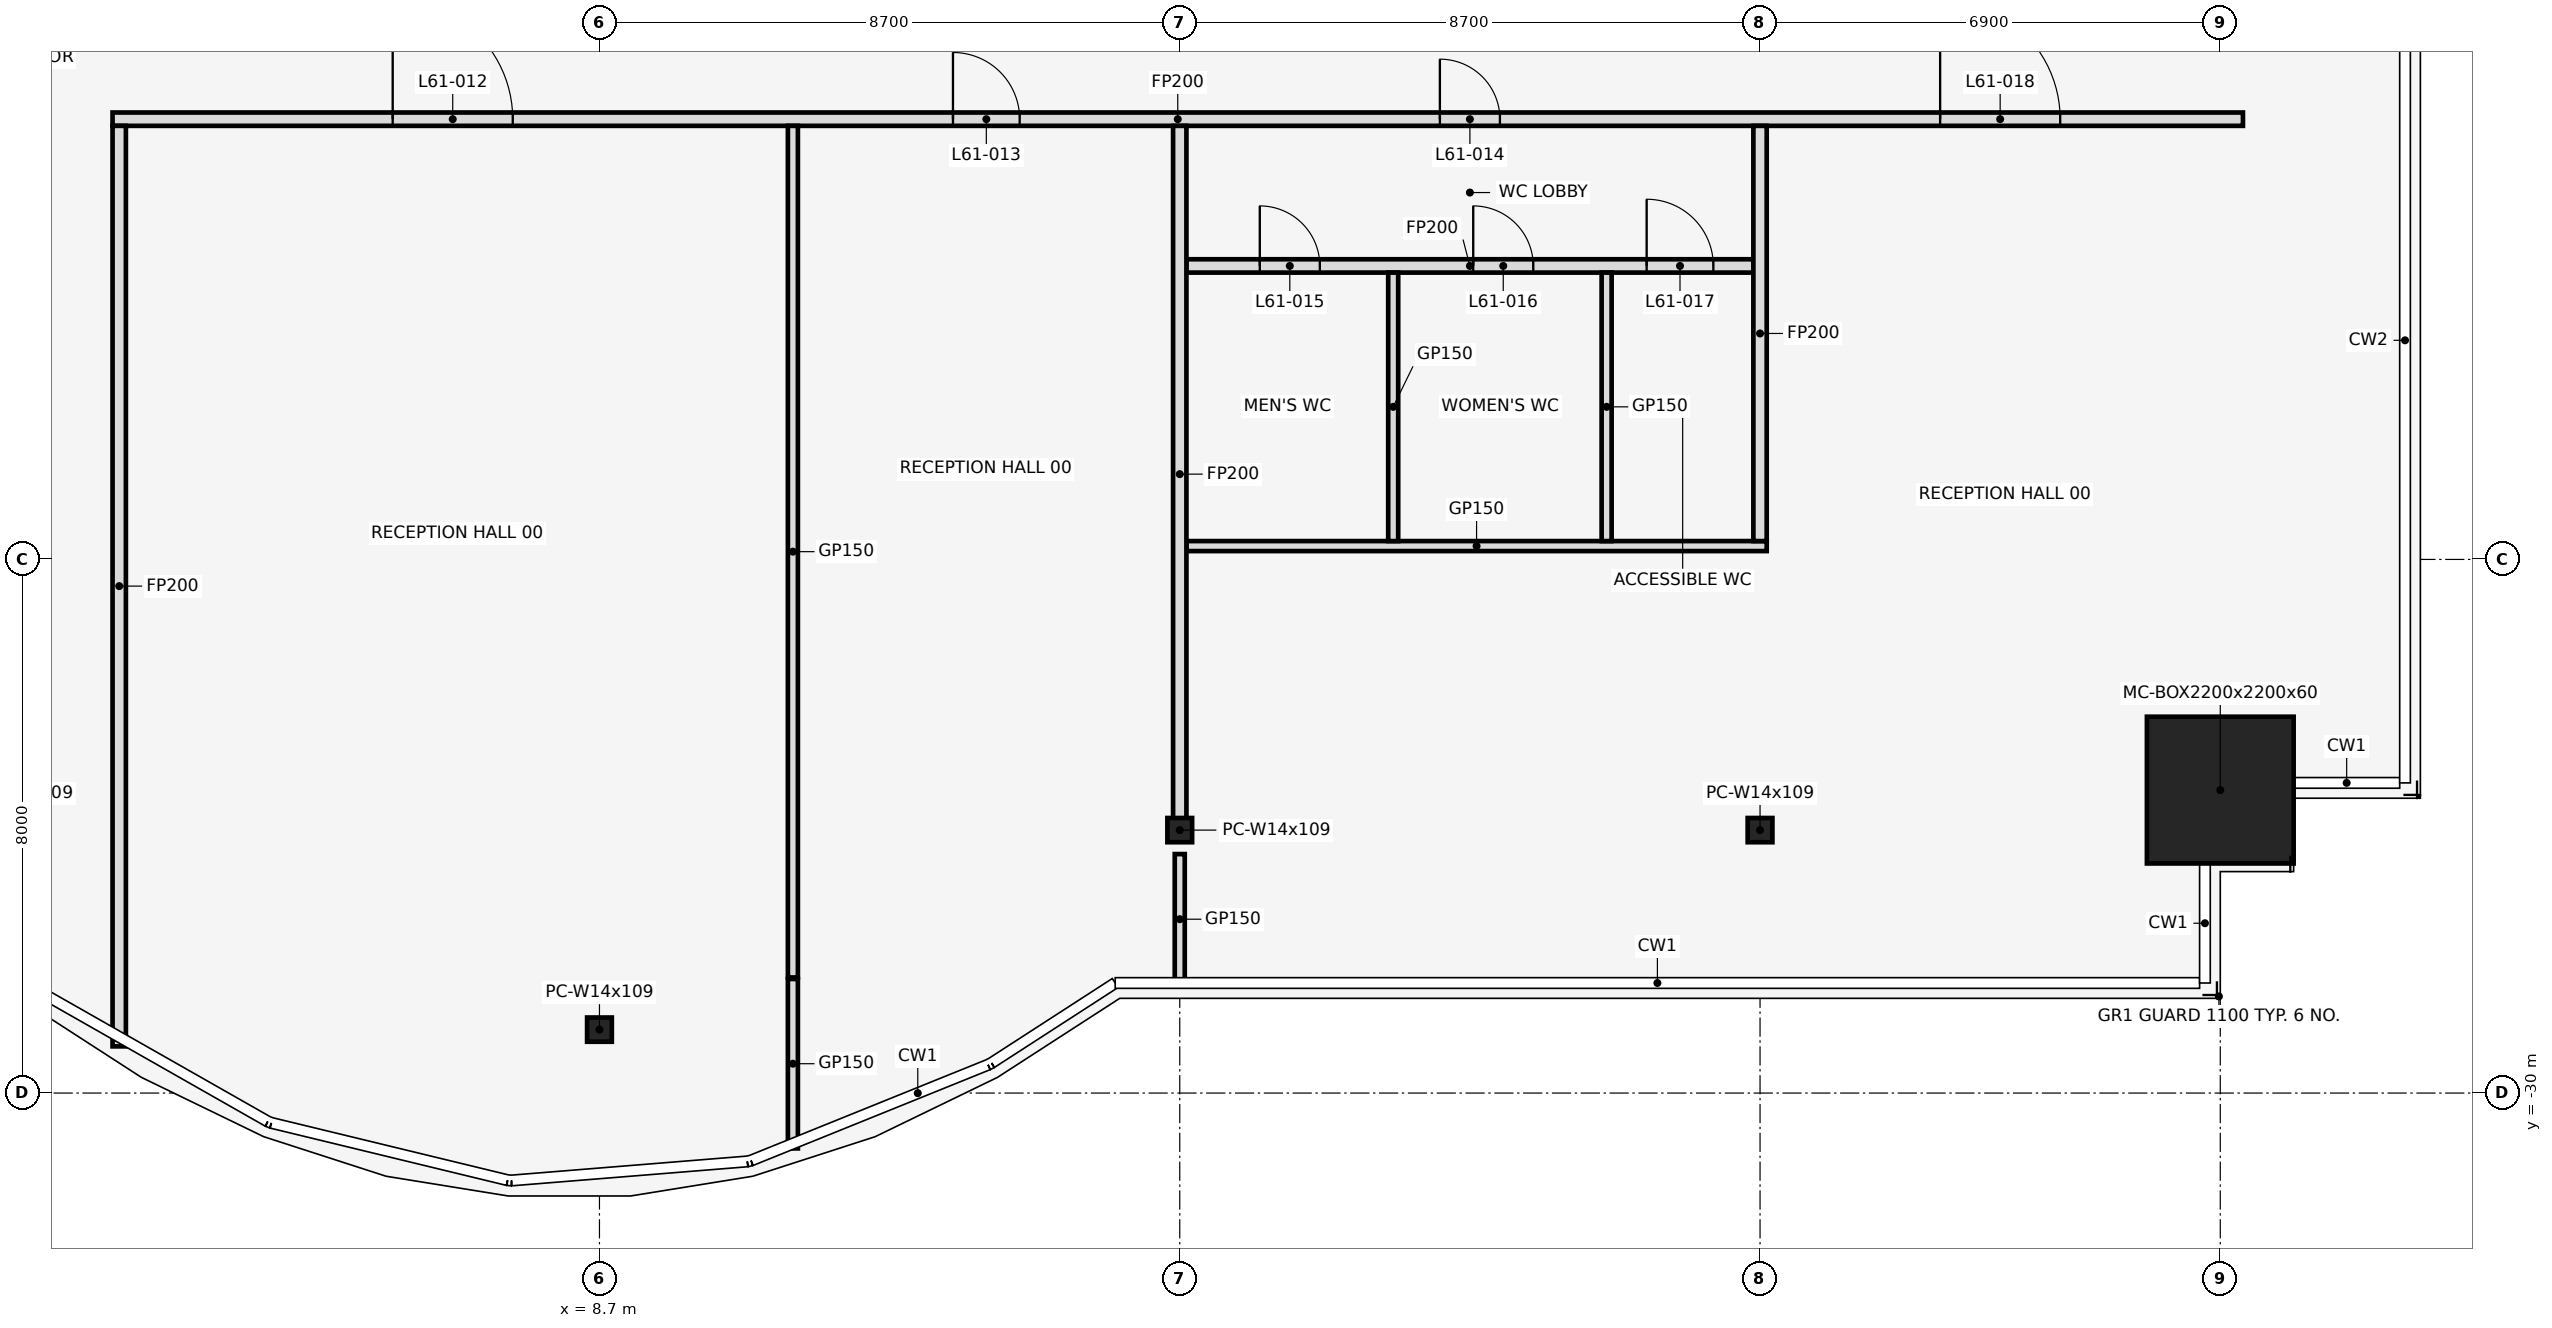
"""IFC4 building model, lengths in metres.
Left out: names, types, materials, properties, quantities, classifications, styles, units other than length and angle.
Written with IfcOpenShell. Run it as: python <this file> out.ifc"""

import sys

from ifc_helpers import new_model, si_unit, direction, frame, frame_2d, origin, origin_2d, place, context, subcontext, project, spatial, rectangle, hollow_rectangle, i_section, extrude, element, fill, save


model = new_model("IFC4")
c1 = context("Model", 3, precision=1e-05, world=origin(), true_north=direction((0.0, 1.0)))
c2 = subcontext(c1, "Body", "Model", "MODEL_VIEW")
j1 = project(units=[si_unit("LENGTHUNIT", "METRE"), si_unit("PLANEANGLEUNIT", "RADIAN")], contexts=[c1])
p1 = place(None, origin())
s1 = spatial("IfcSite", under=j1, at=p1, CompositionType="ELEMENT")
p2 = place(p1, origin())
s2 = spatial("IfcBuilding", under=s1, at=p2, CompositionType="ELEMENT")
p3 = place(p2, frame((0.0, 0.0, 270.8)))
s3 = spatial("IfcBuildingStorey", under=s2, at=p3, CompositionType="ELEMENT", Elevation=270.8)
for number, where, z_axis, x_axis in (
    (1, (8.7, -29.049, 0.0), (0.0, 0.0, 1.0), (1.0, 0.0, 0.0)),
    (2, (17.4, -26.058, 0.0), (0.0, 0.0, 1.0), (1.0, 0.0, 0.0)),
    (3, (26.1, -26.058, 0.0), (0.0, 0.0, 1.0), (1.0, 0.0, 0.0)),
):
    element("IfcColumn", number, at=place(p3, frame(where, z_axis=z_axis, x_axis=x_axis)), inside=s3, PredefinedType="COLUMN", context=c2, shape_type="SweptSolid", body=[
        extrude(i_section(OverallWidth=0.371, OverallDepth=0.363, WebThickness=0.013, FlangeThickness=0.022, at=origin_2d()), origin(), (0.0, 0.0, 1.0), 4.2),
    ])
p4 = place(p3, frame((33.0, -25.458, 0.0), z_axis=(0.0, 0.0, 1.0), x_axis=(1.0, 0.0, 0.0)))
e4 = element("IfcColumn", 4, at=p4, inside=s3, PredefinedType="COLUMN", context=c2, shape_type="SweptSolid", body=[
    extrude(hollow_rectangle(XDim=2.2, YDim=2.2, WallThickness=0.06, at=origin_2d()), origin(), (0.0, 0.0, 1.0), 4.2),
])
p5 = place(p3, frame((17.5, -21.8, 0.0), z_axis=(0.0, 0.0, 1.0), x_axis=(1.0, 0.0, 0.0)))
e5 = element("IfcWall", 5, at=p5, inside=s3, PredefinedType="PARTITIONING", context=c2, shape_type="SweptSolid", body=[
    extrude(rectangle(XDim=8.7, YDim=0.15, at=frame_2d((4.35, 0.0))), origin(), (0.0, 0.0, 1.0), 3.118),
])
p6 = place(p3, frame((17.5, -17.6, 0.0), z_axis=(0.0, 0.0, 1.0), x_axis=(1.0, 0.0, 0.0)))
e6 = element("IfcWall", 6, at=p6, inside=s3, PredefinedType="PARTITIONING", context=c2, shape_type="SweptSolid", body=[
    extrude(rectangle(XDim=8.5, YDim=0.2, at=frame_2d((4.25, 0.0))), origin(), (0.0, 0.0, 1.0), 3.118),
])
p7 = place(p6, frame((1.1, 0.0, 0.0)))
e7 = element("IfcOpeningElement", 7, at=p7, cuts=e6, PredefinedType="OPENING", context=c2, shape_type="SweptSolid", body=[
    extrude(rectangle(XDim=0.9, YDim=2.1, at=frame_2d((0.45, 1.05))), frame((0.0, 0.112, 0.0), z_axis=(0.0, -1.0, 0.0), x_axis=(1.0, 0.0, 0.0)), (0.0, 0.0, 1.0), 0.224),
])
p8 = place(p6, frame((4.3, 0.0, 0.0)))
e8 = element("IfcOpeningElement", 8, at=p8, cuts=e6, PredefinedType="OPENING", context=c2, shape_type="SweptSolid", body=[
    extrude(rectangle(XDim=0.9, YDim=2.1, at=frame_2d((0.45, 1.05))), frame((0.0, 0.112, 0.0), z_axis=(0.0, -1.0, 0.0), x_axis=(1.0, 0.0, 0.0)), (0.0, 0.0, 1.0), 0.224),
])
p9 = place(p6, frame((6.9, 0.0, 0.0)))
e9 = element("IfcOpeningElement", 9, at=p9, cuts=e6, PredefinedType="OPENING", context=c2, shape_type="SweptSolid", body=[
    extrude(rectangle(XDim=1.0, YDim=2.1, at=frame_2d((0.5, 1.05))), frame((0.0, 0.112, 0.0), z_axis=(0.0, -1.0, 0.0), x_axis=(1.0, 0.0, 0.0)), (0.0, 0.0, 1.0), 0.224),
])
p10 = place(p3, frame((1.4, -15.4, 0.0), z_axis=(0.0, 0.0, 1.0), x_axis=(1.0, 0.0, 0.0)))
e10 = element("IfcWall", 10, at=p10, inside=s3, PredefinedType="PARTITIONING", context=c2, shape_type="SweptSolid", body=[
    extrude(rectangle(XDim=31.94, YDim=0.2, at=frame_2d((15.97, 0.0))), origin(), (0.0, 0.0, 1.0), 3.118),
])
p11 = place(p10, frame((4.2, 0.0, 0.0)))
e11 = element("IfcOpeningElement", 11, at=p11, cuts=e10, PredefinedType="OPENING", context=c2, shape_type="SweptSolid", body=[
    extrude(rectangle(XDim=1.8, YDim=2.1, at=frame_2d((0.9, 1.05))), frame((0.0, 0.112, 0.0), z_axis=(0.0, -1.0, 0.0), x_axis=(1.0, 0.0, 0.0)), (0.0, 0.0, 1.0), 0.224),
])
p12 = place(p10, frame((12.6, 0.0, 0.0)))
e12 = element("IfcOpeningElement", 12, at=p12, cuts=e10, PredefinedType="OPENING", context=c2, shape_type="SweptSolid", body=[
    extrude(rectangle(XDim=1.0, YDim=2.1, at=frame_2d((0.5, 1.05))), frame((0.0, 0.112, 0.0), z_axis=(0.0, -1.0, 0.0), x_axis=(1.0, 0.0, 0.0)), (0.0, 0.0, 1.0), 0.224),
])
p13 = place(p10, frame((19.9, 0.0, 0.0)))
e13 = element("IfcOpeningElement", 13, at=p13, cuts=e10, PredefinedType="OPENING", context=c2, shape_type="SweptSolid", body=[
    extrude(rectangle(XDim=0.9, YDim=2.1, at=frame_2d((0.45, 1.05))), frame((0.0, 0.112, 0.0), z_axis=(0.0, -1.0, 0.0), x_axis=(1.0, 0.0, 0.0)), (0.0, 0.0, 1.0), 0.224),
])
p14 = place(p10, frame((27.4, 0.0, 0.0)))
e14 = element("IfcOpeningElement", 14, at=p14, cuts=e10, PredefinedType="OPENING", context=c2, shape_type="SweptSolid", body=[
    extrude(rectangle(XDim=1.8, YDim=2.1, at=frame_2d((0.9, 1.05))), frame((0.0, 0.112, 0.0), z_axis=(0.0, -1.0, 0.0), x_axis=(1.0, 0.0, 0.0)), (0.0, 0.0, 1.0), 0.224),
])
p15 = place(p3, frame((1.5, -29.3, 0.0), z_axis=(0.0, 0.0, 1.0), x_axis=(0.0, 1.0, 0.0)))
e15 = element("IfcWall", 15, at=p15, inside=s3, PredefinedType="PARTITIONING", context=c2, shape_type="SweptSolid", body=[
    extrude(rectangle(XDim=13.8, YDim=0.2, at=frame_2d((6.9, 0.0))), origin(), (0.0, 0.0, 1.0), 3.118),
])
p16 = place(p3, frame((11.6, -30.83, 0.0), z_axis=(0.0, 0.0, 1.0), x_axis=(0.0, 1.0, 0.0)))
e16 = element("IfcWall", 16, at=p16, inside=s3, PredefinedType="PARTITIONING", context=c2, shape_type="SweptSolid", body=[
    extrude(rectangle(XDim=2.54, YDim=0.15, at=frame_2d((1.27, 0.0))), origin(), (0.0, 0.0, 1.0), 3.118),
])
p17 = place(p3, frame((11.6, -28.267, 0.0), z_axis=(0.0, 0.0, 1.0), x_axis=(0.0, 1.0, 0.0)))
e17 = element("IfcWall", 17, at=p17, inside=s3, PredefinedType="PARTITIONING", context=c2, shape_type="SweptSolid", body=[
    extrude(rectangle(XDim=12.767, YDim=0.15, at=frame_2d((6.384, 0.0))), origin(), (0.0, 0.0, 1.0), 3.118),
])
p18 = place(p3, frame((17.4, -28.37, 0.0), z_axis=(0.0, 0.0, 1.0), x_axis=(0.0, 1.0, 0.0)))
e18 = element("IfcWall", 18, at=p18, inside=s3, PredefinedType="PARTITIONING", context=c2, shape_type="SweptSolid", body=[
    extrude(rectangle(XDim=1.953, YDim=0.15, at=frame_2d((0.977, 0.0))), origin(), (0.0, 0.0, 1.0), 3.118),
])
p19 = place(p3, frame((17.4, -25.943, 0.0), z_axis=(0.0, 0.0, 1.0), x_axis=(0.0, 1.0, 0.0)))
e19 = element("IfcWall", 19, at=p19, inside=s3, PredefinedType="PARTITIONING", context=c2, shape_type="SweptSolid", body=[
    extrude(rectangle(XDim=10.443, YDim=0.2, at=frame_2d((5.221, 0.0))), origin(), (0.0, 0.0, 1.0), 3.118),
])
for number, where, z_axis, x_axis in (
    (20, (20.6, -21.725, 0.0), (0.0, 0.0, 1.0), (0.0, 1.0, 0.0)),
    (21, (23.8, -21.725, 0.0), (0.0, 0.0, 1.0), (0.0, 1.0, 0.0)),
):
    element("IfcWall", number, at=place(p3, frame(where, z_axis=z_axis, x_axis=x_axis)), inside=s3, PredefinedType="PARTITIONING", context=c2, shape_type="SweptSolid", body=[
        extrude(rectangle(XDim=4.025, YDim=0.15, at=frame_2d((2.013, 0.0))), origin(), (0.0, 0.0, 1.0), 3.118),
    ])
p20 = place(p3, frame((26.1, -21.725, 0.0), z_axis=(0.0, 0.0, 1.0), x_axis=(0.0, 1.0, 0.0)))
e22 = element("IfcWall", 22, at=p20, inside=s3, PredefinedType="PARTITIONING", context=c2, shape_type="SweptSolid", body=[
    extrude(rectangle(XDim=6.225, YDim=0.2, at=frame_2d((3.113, 0.0))), origin(), (0.0, 0.0, 1.0), 3.118),
])
p21 = place(p11, origin())
e23 = element("IfcDoor", 23, at=p21, inside=s3, OperationType="SINGLE_SWING_LEFT", PredefinedType="DOOR", context=c2, shape_type="SweptSolid", body=[
    extrude(rectangle(XDim=1.8, YDim=2.1, at=frame_2d((0.9, 1.05))), frame((0.0, 0.025, 0.0), z_axis=(0.0, -1.0, 0.0), x_axis=(1.0, 0.0, 0.0)), (0.0, 0.0, 1.0), 0.05),
])
fill(e11, e23)
p22 = place(p12, frame((1.0, 0.0, 0.0), z_axis=(0.0, 0.0, 1.0), x_axis=(-1.0, 0.0, 0.0)))
e24 = element("IfcDoor", 24, at=p22, inside=s3, OperationType="SINGLE_SWING_LEFT", PredefinedType="DOOR", context=c2, shape_type="SweptSolid", body=[
    extrude(rectangle(XDim=1.0, YDim=2.1, at=frame_2d((0.5, 1.05))), frame((0.0, 0.025, 0.0), z_axis=(0.0, -1.0, 0.0), x_axis=(1.0, 0.0, 0.0)), (0.0, 0.0, 1.0), 0.05),
])
fill(e12, e24)
p23 = place(p13, frame((0.9, 0.0, 0.0), z_axis=(0.0, 0.0, 1.0), x_axis=(-1.0, 0.0, 0.0)))
e25 = element("IfcDoor", 25, at=p23, inside=s3, OperationType="SINGLE_SWING_RIGHT", PredefinedType="DOOR", context=c2, shape_type="SweptSolid", body=[
    extrude(rectangle(XDim=0.9, YDim=2.1, at=frame_2d((0.45, 1.05))), frame((0.0, 0.025, 0.0), z_axis=(0.0, -1.0, 0.0), x_axis=(1.0, 0.0, 0.0)), (0.0, 0.0, 1.0), 0.05),
])
fill(e13, e25)
p24 = place(p7, frame((0.9, 0.0, 0.0), z_axis=(0.0, 0.0, 1.0), x_axis=(-1.0, 0.0, 0.0)))
e26 = element("IfcDoor", 26, at=p24, inside=s3, OperationType="SINGLE_SWING_RIGHT", PredefinedType="DOOR", context=c2, shape_type="SweptSolid", body=[
    extrude(rectangle(XDim=0.9, YDim=2.1, at=frame_2d((0.45, 1.05))), frame((0.0, 0.025, 0.0), z_axis=(0.0, -1.0, 0.0), x_axis=(1.0, 0.0, 0.0)), (0.0, 0.0, 1.0), 0.05),
])
fill(e7, e26)
p25 = place(p8, frame((0.9, 0.0, 0.0), z_axis=(0.0, 0.0, 1.0), x_axis=(-1.0, 0.0, 0.0)))
e27 = element("IfcDoor", 27, at=p25, inside=s3, OperationType="SINGLE_SWING_LEFT", PredefinedType="DOOR", context=c2, shape_type="SweptSolid", body=[
    extrude(rectangle(XDim=0.9, YDim=2.1, at=frame_2d((0.45, 1.05))), frame((0.0, 0.025, 0.0), z_axis=(0.0, -1.0, 0.0), x_axis=(1.0, 0.0, 0.0)), (0.0, 0.0, 1.0), 0.05),
])
fill(e8, e27)
p26 = place(p9, frame((1.0, 0.0, 0.0), z_axis=(0.0, 0.0, 1.0), x_axis=(-1.0, 0.0, 0.0)))
e28 = element("IfcDoor", 28, at=p26, inside=s3, OperationType="SINGLE_SWING_RIGHT", PredefinedType="DOOR", context=c2, shape_type="SweptSolid", body=[
    extrude(rectangle(XDim=1.0, YDim=2.1, at=frame_2d((0.5, 1.05))), frame((0.0, 0.025, 0.0), z_axis=(0.0, -1.0, 0.0), x_axis=(1.0, 0.0, 0.0)), (0.0, 0.0, 1.0), 0.05),
])
fill(e9, e28)
p27 = place(p14, origin())
e29 = element("IfcDoor", 29, at=p27, inside=s3, OperationType="SINGLE_SWING_LEFT", PredefinedType="DOOR", context=c2, shape_type="SweptSolid", body=[
    extrude(rectangle(XDim=1.8, YDim=2.1, at=frame_2d((0.9, 1.05))), frame((0.0, 0.025, 0.0), z_axis=(0.0, -1.0, 0.0), x_axis=(1.0, 0.0, 0.0)), (0.0, 0.0, 1.0), 0.05),
])
fill(e14, e29)
save(model, sys.argv[1])
